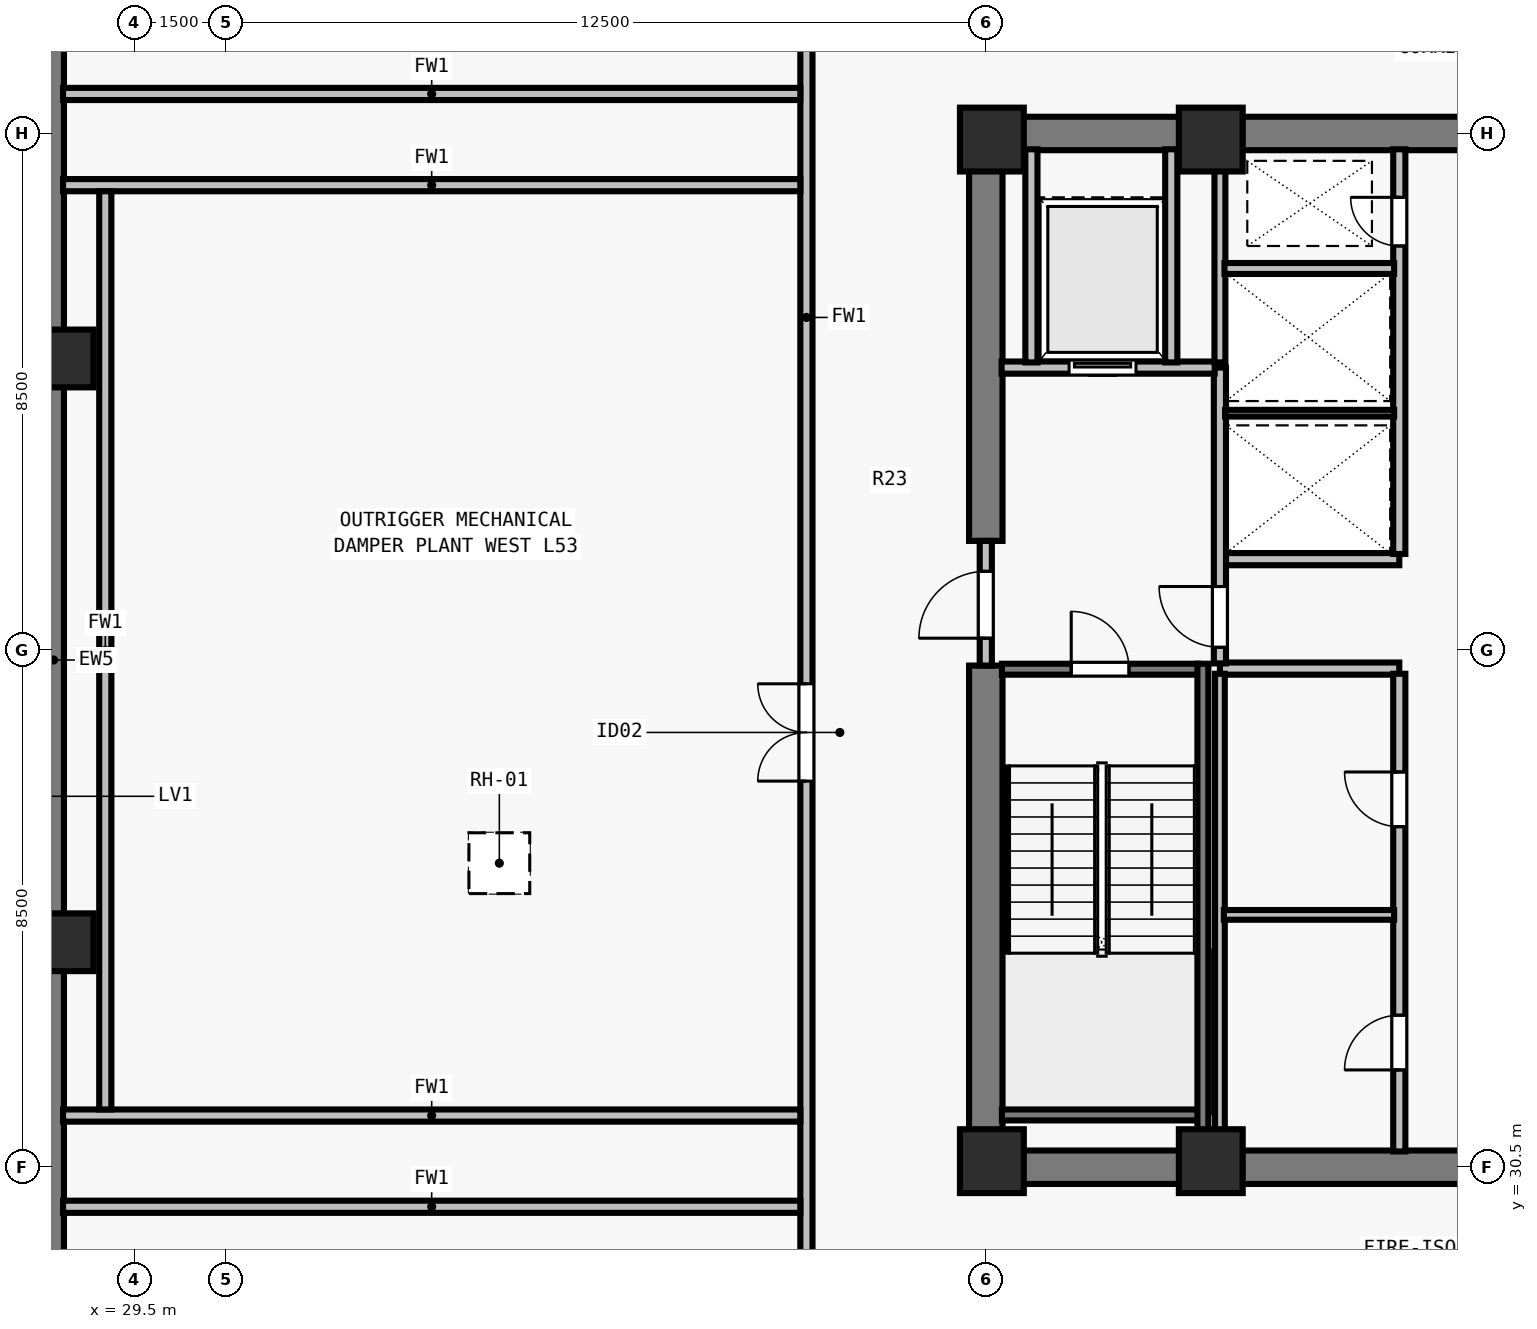
"""IFC4 building model, lengths in metres.
Left out: names, types, materials, properties, quantities, classifications, styles, units other than length and angle.
Written with IfcOpenShell. Run it as: python <this file> out.ifc"""

import sys

from ifc_helpers import new_model, si_unit, direction, frame, frame_2d, origin, origin_2d, place, context, subcontext, project, spatial, rectangle, extrude, element, fill, save


model = new_model("IFC4")
c1 = context("Model", 3, precision=1e-05, world=origin(), true_north=direction((0.0, 1.0)))
c2 = subcontext(c1, "Body", "Model", "MODEL_VIEW")
j1 = project(units=[si_unit("LENGTHUNIT", "METRE"), si_unit("PLANEANGLEUNIT", "RADIAN")], contexts=[c1])
p1 = place(None, origin())
s1 = spatial("IfcSite", under=j1, at=p1, CompositionType="ELEMENT")
p2 = place(p1, origin())
s2 = spatial("IfcBuilding", under=s1, at=p2, CompositionType="ELEMENT")
p3 = place(p2, frame((0.0, 0.0, 193.5)))
s3 = spatial("IfcBuildingStorey", under=s2, at=p3, CompositionType="ELEMENT", Elevation=193.5)
for number, where, z_axis, x_axis in (
    (1, (43.6, 30.6, 0.0), (0.0, 0.0, 1.0), (1.0, 0.0, 0.0)),
    (2, (47.2, 30.6, 0.0), (0.0, 0.0, 1.0), (1.0, 0.0, 0.0)),
    (3, (43.6, 47.4, 0.0), (0.0, 0.0, 1.0), (1.0, 0.0, 0.0)),
    (4, (47.2, 47.4, 0.0), (0.0, 0.0, 1.0), (1.0, 0.0, 0.0)),
):
    element("IfcColumn", number, at=place(p3, frame(where, z_axis=z_axis, x_axis=x_axis)), inside=s3, PredefinedType="COLUMN", context=c2, shape_type="SweptSolid", body=[
        extrude(rectangle(XDim=1.05, YDim=1.05, at=origin_2d()), origin(), (0.0, 0.0, 1.0), 4.5),
    ])
for number, where, z_axis, x_axis in (
    (5, (28.35, 43.8, 0.0), (0.0, 0.0, 1.0), (0.0, 1.0, 0.0)),
    (6, (28.35, 34.2, 0.0), (0.0, 0.0, 1.0), (0.0, 1.0, 0.0)),
):
    element("IfcColumn", number, at=place(p3, frame(where, z_axis=z_axis, x_axis=x_axis)), inside=s3, PredefinedType="COLUMN", context=c2, shape_type="SweptSolid", body=[
        extrude(rectangle(XDim=0.95, YDim=0.95, at=origin_2d()), origin(), (0.0, 0.0, 1.0), 4.5),
    ])
p4 = place(p3, frame((28.17, 19.0, 0.0), z_axis=(0.0, 0.0, 1.0), x_axis=(0.0, 1.0, 0.0)))
e7 = element("IfcWall", 7, at=p4, inside=s3, PredefinedType="SOLIDWALL", context=c2, shape_type="SweptSolid", body=[
    extrude(rectangle(XDim=39.682, YDim=0.34, at=frame_2d((19.841, 0.0))), origin(), (0.0, 0.0, 1.0), 4.29),
])
for number, where, z_axis, x_axis in (
    (8, (43.225, 30.5, 0.0), (0.0, 0.0, 1.0), (1.0, 0.0, 0.0)),
    (9, (43.225, 47.5, 0.0), (0.0, 0.0, 1.0), (1.0, 0.0, 0.0)),
):
    element("IfcWall", number, at=place(p3, frame(where, z_axis=z_axis, x_axis=x_axis)), inside=s3, PredefinedType="SHEAR", context=c2, shape_type="SweptSolid", body=[
        extrude(rectangle(XDim=17.55, YDim=0.55, at=frame_2d((8.775, 0.0))), origin(), (0.0, 0.0, 1.0), 4.29),
    ])
p5 = place(p3, frame((43.5, 30.765, 0.0), z_axis=(0.0, 0.0, 1.0), x_axis=(0.0, 1.0, 0.0)))
e10 = element("IfcWall", 10, at=p5, inside=s3, PredefinedType="SHEAR", context=c2, shape_type="SweptSolid", body=[
    extrude(rectangle(XDim=7.985, YDim=0.55, at=frame_2d((3.993, 0.0))), origin(), (0.0, 0.0, 1.0), 4.29),
])
p6 = place(p3, frame((43.5, 40.8, 0.0), z_axis=(0.0, 0.0, 1.0), x_axis=(0.0, 1.0, 0.0)))
e11 = element("IfcWall", 11, at=p6, inside=s3, PredefinedType="SHEAR", context=c2, shape_type="SweptSolid", body=[
    extrude(rectangle(XDim=6.435, YDim=0.55, at=frame_2d((3.218, 0.0))), origin(), (0.0, 0.0, 1.0), 4.29),
])
for number, where, z_axis, x_axis in (
    (12, (47.35, 38.7, 0.0), (0.0, 0.0, 1.0), (1.0, 0.0, 0.0)),
    (13, (47.35, 40.5, 0.0), (0.0, 0.0, 1.0), (1.0, 0.0, 0.0)),
):
    element("IfcWall", number, at=place(p3, frame(where, z_axis=z_axis, x_axis=x_axis)), inside=s3, PredefinedType="SOLIDWALL", context=c2, shape_type="SweptSolid", body=[
        extrude(rectangle(XDim=2.95, YDim=0.2, at=frame_2d((1.475, 0.0))), origin(), (0.0, 0.0, 1.0), 4.29),
    ])
p7 = place(p3, frame((50.3, 30.76, 0.0), z_axis=(0.0, 0.0, 1.0), x_axis=(0.0, 1.0, 0.0)))
e14 = element("IfcWall", 14, at=p7, inside=s3, PredefinedType="SOLIDWALL", context=c2, shape_type="SweptSolid", body=[
    extrude(rectangle(XDim=7.855, YDim=0.2, at=frame_2d((3.927, 0.0))), origin(), (0.0, 0.0, 1.0), 4.29),
])
p8 = place(p7, frame((1.34, 0.0, 0.0)))
e15 = element("IfcOpeningElement", 15, at=p8, cuts=e14, PredefinedType="OPENING", context=c2, shape_type="SweptSolid", body=[
    extrude(rectangle(XDim=0.9, YDim=2.12, at=frame_2d((0.45, 1.06))), frame((0.0, 0.11, 0.0), z_axis=(0.0, -1.0, 0.0), x_axis=(1.0, 0.0, 0.0)), (0.0, 0.0, 1.0), 0.22),
])
p9 = place(p7, frame((5.34, 0.0, 0.0)))
e16 = element("IfcOpeningElement", 16, at=p9, cuts=e14, PredefinedType="OPENING", context=c2, shape_type="SweptSolid", body=[
    extrude(rectangle(XDim=0.9, YDim=2.12, at=frame_2d((0.45, 1.06))), frame((0.0, 0.11, 0.0), z_axis=(0.0, -1.0, 0.0), x_axis=(1.0, 0.0, 0.0)), (0.0, 0.0, 1.0), 0.22),
])
p10 = place(p3, frame((50.3, 40.585, 0.0), z_axis=(0.0, 0.0, 1.0), x_axis=(0.0, 1.0, 0.0)))
e17 = element("IfcWall", 17, at=p10, inside=s3, PredefinedType="SOLIDWALL", context=c2, shape_type="SweptSolid", body=[
    extrude(rectangle(XDim=6.655, YDim=0.2, at=frame_2d((3.328, 0.0))), origin(), (0.0, 0.0, 1.0), 4.29),
])
p11 = place(p10, frame((5.065, 0.0, 0.0)))
e18 = element("IfcOpeningElement", 18, at=p11, cuts=e17, PredefinedType="OPENING", context=c2, shape_type="SweptSolid", body=[
    extrude(rectangle(XDim=0.8, YDim=2.08, at=frame_2d((0.4, 1.04))), frame((0.0, 0.11, 0.0), z_axis=(0.0, -1.0, 0.0), x_axis=(1.0, 0.0, 0.0)), (0.0, 0.0, 1.0), 0.22),
])
p12 = place(p3, frame((43.5, 38.75, 0.0), z_axis=(0.0, 0.0, 1.0), x_axis=(0.0, 1.0, 0.0)))
e19 = element("IfcWall", 19, at=p12, inside=s3, PredefinedType="SOLIDWALL", context=c2, shape_type="SweptSolid", body=[
    extrude(rectangle(XDim=2.05, YDim=0.2, at=frame_2d((1.025, 0.0))), origin(), (0.0, 0.0, 1.0), 4.29),
])
p13 = place(p12, frame((0.45, 0.0, 0.0)))
e20 = element("IfcOpeningElement", 20, at=p13, cuts=e19, PredefinedType="OPENING", context=c2, shape_type="SweptSolid", body=[
    extrude(rectangle(XDim=1.1, YDim=2.15, at=frame_2d((0.55, 1.075))), frame((0.0, 0.11, 0.0), z_axis=(0.0, -1.0, 0.0), x_axis=(1.0, 0.0, 0.0)), (0.0, 0.0, 1.0), 0.22),
])
p14 = place(p3, frame((47.35, 38.785, 0.0), z_axis=(0.0, 0.0, 1.0), x_axis=(0.0, 1.0, 0.0)))
e21 = element("IfcWall", 21, at=p14, inside=s3, PredefinedType="SOLIDWALL", context=c2, shape_type="SweptSolid", body=[
    extrude(rectangle(XDim=4.865, YDim=0.2, at=frame_2d((2.433, 0.0))), origin(), (0.0, 0.0, 1.0), 4.29),
])
p15 = place(p14, frame((0.265, 0.0, 0.0)))
e22 = element("IfcOpeningElement", 22, at=p15, cuts=e21, PredefinedType="OPENING", context=c2, shape_type="SweptSolid", body=[
    extrude(rectangle(XDim=1.0, YDim=2.15, at=frame_2d((0.5, 1.075))), frame((0.0, 0.11, 0.0), z_axis=(0.0, -1.0, 0.0), x_axis=(1.0, 0.0, 0.0)), (0.0, 0.0, 1.0), 0.22),
])
p16 = place(p3, frame((43.76, 43.65, 0.0), z_axis=(0.0, 0.0, 1.0), x_axis=(1.0, 0.0, 0.0)))
e23 = element("IfcWall", 23, at=p16, inside=s3, PredefinedType="SOLIDWALL", context=c2, shape_type="SweptSolid", body=[
    extrude(rectangle(XDim=3.505, YDim=0.2, at=frame_2d((1.752, 0.0))), origin(), (0.0, 0.0, 1.0), 4.29),
])
p17 = place(p16, frame((1.11, 0.0, 0.0)))
e24 = element("IfcOpeningElement", 24, at=p17, cuts=e23, PredefinedType="OPENING", context=c2, shape_type="SweptSolid", body=[
    extrude(rectangle(XDim=1.1, YDim=2.2, at=frame_2d((0.55, 1.1))), frame((0.0, 0.11, 0.0), z_axis=(0.0, -1.0, 0.0), x_axis=(1.0, 0.0, 0.0)), (0.0, 0.0, 1.0), 0.22),
])
for number, where, z_axis, x_axis in (
    (25, (46.55, 43.735, 0.0), (0.0, 0.0, 1.0), (0.0, 1.0, 0.0)),
    (26, (44.25, 43.735, 0.0), (0.0, 0.0, 1.0), (0.0, 1.0, 0.0)),
):
    element("IfcWall", number, at=place(p3, frame(where, z_axis=z_axis, x_axis=x_axis)), inside=s3, PredefinedType="SOLIDWALL", context=c2, shape_type="SweptSolid", body=[
        extrude(rectangle(XDim=3.505, YDim=0.2, at=frame_2d((1.752, 0.0))), origin(), (0.0, 0.0, 1.0), 4.29),
    ])
p18 = place(p3, frame((47.35, 30.76, 0.0), z_axis=(0.0, 0.0, 1.0), x_axis=(0.0, 1.0, 0.0)))
e27 = element("IfcWall", 27, at=p18, inside=s3, PredefinedType="PARTITIONING", context=c2, shape_type="SweptSolid", body=[
    extrude(rectangle(XDim=7.855, YDim=0.16, at=frame_2d((3.927, 0.0))), origin(), (0.0, 0.0, 1.0), 4.29),
])
p19 = place(p3, frame((47.415, 34.65, 0.0), z_axis=(0.0, 0.0, 1.0), x_axis=(1.0, 0.0, 0.0)))
e28 = element("IfcWall", 28, at=p19, inside=s3, PredefinedType="PARTITIONING", context=c2, shape_type="SweptSolid", body=[
    extrude(rectangle(XDim=2.8, YDim=0.16, at=frame_2d((1.4, 0.0))), origin(), (0.0, 0.0, 1.0), 4.29),
])
p20 = place(p3, frame((47.35, 43.735, 0.0), z_axis=(0.0, 0.0, 1.0), x_axis=(0.0, 1.0, 0.0)))
e29 = element("IfcWall", 29, at=p20, inside=s3, PredefinedType="SOLIDWALL", context=c2, shape_type="SweptSolid", body=[
    extrude(rectangle(XDim=3.505, YDim=0.18, at=frame_2d((1.752, 0.0))), origin(), (0.0, 0.0, 1.0), 4.29),
])
p21 = place(p3, frame((47.435, 42.9, 0.0), z_axis=(0.0, 0.0, 1.0), x_axis=(1.0, 0.0, 0.0)))
e30 = element("IfcWall", 30, at=p21, inside=s3, PredefinedType="PARTITIONING", context=c2, shape_type="SweptSolid", body=[
    extrude(rectangle(XDim=2.78, YDim=0.11, at=frame_2d((1.39, 0.0))), origin(), (0.0, 0.0, 1.0), 4.29),
])
p22 = place(p3, frame((47.425, 45.28, 0.0), z_axis=(0.0, 0.0, 1.0), x_axis=(1.0, 0.0, 0.0)))
e31 = element("IfcWall", 31, at=p22, inside=s3, PredefinedType="SOLIDWALL", context=c2, shape_type="SweptSolid", body=[
    extrude(rectangle(XDim=2.79, YDim=0.18, at=frame_2d((1.395, 0.0))), origin(), (0.0, 0.0, 1.0), 4.29),
])
p23 = place(p3, frame((40.55, 27.65, 0.0), z_axis=(0.0, 0.0, 1.0), x_axis=(0.0, 1.0, 0.0)))
e32 = element("IfcWall", 32, at=p23, inside=s3, PredefinedType="SOLIDWALL", context=c2, shape_type="SweptSolid", body=[
    extrude(rectangle(XDim=22.7, YDim=0.2, at=frame_2d((11.35, 0.0))), origin(), (0.0, 0.0, 1.0), 4.29),
])
p24 = place(p23, frame((9.2, 0.0, 0.0)))
e33 = element("IfcOpeningElement", 33, at=p24, cuts=e32, PredefinedType="OPENING", context=c2, shape_type="SweptSolid", body=[
    extrude(rectangle(XDim=1.6, YDim=2.2, at=frame_2d((0.8, 1.1))), frame((0.0, 0.11, 0.0), z_axis=(0.0, -1.0, 0.0), x_axis=(1.0, 0.0, 0.0)), (0.0, 0.0, 1.0), 0.22),
])
p25 = place(p3, frame((28.325, 29.85, 0.0), z_axis=(0.0, 0.0, 1.0), x_axis=(1.0, 0.0, 0.0)))
e34 = element("IfcWall", 34, at=p25, inside=s3, PredefinedType="SOLIDWALL", context=c2, shape_type="SweptSolid", body=[
    extrude(rectangle(XDim=12.125, YDim=0.2, at=frame_2d((6.062, 0.0))), origin(), (0.0, 0.0, 1.0), 4.29),
])
for number, where, z_axis, x_axis in (
    (35, (28.325, 31.35, 0.0), (0.0, 0.0, 1.0), (1.0, 0.0, 0.0)),
    (36, (28.325, 46.65, 0.0), (0.0, 0.0, 1.0), (1.0, 0.0, 0.0)),
):
    element("IfcWall", number, at=place(p3, frame(where, z_axis=z_axis, x_axis=x_axis)), inside=s3, PredefinedType="SOLIDWALL", context=c2, shape_type="SweptSolid", body=[
        extrude(rectangle(XDim=12.125, YDim=0.2, at=frame_2d((6.062, 0.0))), origin(), (0.0, 0.0, 1.0), 2.465),
    ])
p26 = place(p3, frame((28.325, 48.15, 0.0), z_axis=(0.0, 0.0, 1.0), x_axis=(1.0, 0.0, 0.0)))
e37 = element("IfcWall", 37, at=p26, inside=s3, PredefinedType="SOLIDWALL", context=c2, shape_type="SweptSolid", body=[
    extrude(rectangle(XDim=12.125, YDim=0.2, at=frame_2d((6.062, 0.0))), origin(), (0.0, 0.0, 1.0), 4.29),
])
p27 = place(p3, frame((29.02, 31.45, 0.0), z_axis=(0.0, 0.0, 1.0), x_axis=(0.0, 1.0, 0.0)))
e38 = element("IfcWall", 38, at=p27, inside=s3, PredefinedType="SOLIDWALL", context=c2, shape_type="SweptSolid", body=[
    extrude(rectangle(XDim=15.1, YDim=0.2, at=frame_2d((7.55, 0.0))), origin(), (0.0, 0.0, 1.0), 4.29),
])
p28 = place(p3, frame((43.765, 38.69, 0.0), z_axis=(0.0, 0.0, 1.0), x_axis=(1.0, 0.0, 0.0)))
e39 = element("IfcWall", 39, at=p28, inside=s3, PredefinedType="SOLIDWALL", context=c2, shape_type="SweptSolid", body=[
    extrude(rectangle(XDim=3.23, YDim=0.18, at=frame_2d((1.615, 0.0))), origin(), (0.0, 0.0, 1.0), 4.29),
])
p29 = place(p28, frame((1.14, 0.0, 0.0)))
e40 = element("IfcOpeningElement", 40, at=p29, cuts=e39, PredefinedType="OPENING", context=c2, shape_type="SweptSolid", body=[
    extrude(rectangle(XDim=0.95, YDim=2.15, at=frame_2d((0.475, 1.075))), frame((0.0, 0.1, 0.0), z_axis=(0.0, -1.0, 0.0), x_axis=(1.0, 0.0, 0.0)), (0.0, 0.0, 1.0), 0.2),
])
p30 = place(p3, frame((43.765, 31.36, 0.0), z_axis=(0.0, 0.0, 1.0), x_axis=(1.0, 0.0, 0.0)))
e41 = element("IfcWall", 41, at=p30, inside=s3, PredefinedType="SOLIDWALL", context=c2, shape_type="SweptSolid", body=[
    extrude(rectangle(XDim=3.23, YDim=0.18, at=frame_2d((1.615, 0.0))), origin(), (0.0, 0.0, 1.0), 4.29),
])
p31 = place(p3, frame((47.07, 38.78, 0.0), z_axis=(0.0, 0.0, 1.0), x_axis=(0.0, -1.0, 0.0)))
e42 = element("IfcWall", 42, at=p31, inside=s3, PredefinedType="SOLIDWALL", context=c2, shape_type="SweptSolid", body=[
    extrude(rectangle(XDim=8.017, YDim=0.18, at=frame_2d((4.009, 0.0))), origin(), (0.0, 0.0, 1.0), 4.29),
])
p32 = place(p3, frame((0.0, 0.0, -0.26)))
p33 = place(p32, frame((35.5, 35.5, 0.0)))
p34 = place(p33, frame((0.0, 0.0, 0.21)))
e43 = element("IfcDoor", 43, at=p34, inside=s3, OperationType="SINGLE_SWING_LEFT", PredefinedType="TRAPDOOR", context=c2, shape_type="SweptSolid", body=[
    extrude(rectangle(XDim=1.0, YDim=1.0, at=origin_2d()), origin(), (0.0, 0.0, 1.0), 0.05),
])
p35 = place(p13, origin())
e44 = element("IfcDoor", 44, at=p35, inside=s3, OperationType="SINGLE_SWING_LEFT", PredefinedType="DOOR", context=c2, shape_type="SweptSolid", body=[
    extrude(rectangle(XDim=1.1, YDim=2.15, at=frame_2d((0.55, 1.075))), frame((0.0, 0.025, 0.0), z_axis=(0.0, -1.0, 0.0), x_axis=(1.0, 0.0, 0.0)), (0.0, 0.0, 1.0), 0.05),
])
fill(e20, e44)
p36 = place(p15, origin())
e45 = element("IfcDoor", 45, at=p36, inside=s3, OperationType="SINGLE_SWING_RIGHT", PredefinedType="DOOR", context=c2, shape_type="SweptSolid", body=[
    extrude(rectangle(XDim=1.0, YDim=2.15, at=frame_2d((0.5, 1.075))), frame((0.0, 0.025, 0.0), z_axis=(0.0, -1.0, 0.0), x_axis=(1.0, 0.0, 0.0)), (0.0, 0.0, 1.0), 0.05),
])
fill(e22, e45)
p37 = place(p17, origin())
e46 = element("IfcDoor", 46, at=p37, inside=s3, OperationType="SLIDING_TO_LEFT", PredefinedType="DOOR", context=c2, shape_type="SweptSolid", body=[
    extrude(rectangle(XDim=1.1, YDim=2.2, at=frame_2d((0.55, 1.1))), frame((0.0, 0.025, 0.0), z_axis=(0.0, -1.0, 0.0), x_axis=(1.0, 0.0, 0.0)), (0.0, 0.0, 1.0), 0.05),
])
fill(e24, e46)
p38 = place(p8, origin())
e47 = element("IfcDoor", 47, at=p38, inside=s3, OperationType="SINGLE_SWING_LEFT", PredefinedType="DOOR", context=c2, shape_type="SweptSolid", body=[
    extrude(rectangle(XDim=0.9, YDim=2.12, at=frame_2d((0.45, 1.06))), frame((0.0, 0.025, 0.0), z_axis=(0.0, -1.0, 0.0), x_axis=(1.0, 0.0, 0.0)), (0.0, 0.0, 1.0), 0.05),
])
fill(e15, e47)
p39 = place(p9, origin())
e48 = element("IfcDoor", 48, at=p39, inside=s3, OperationType="SINGLE_SWING_RIGHT", PredefinedType="DOOR", context=c2, shape_type="SweptSolid", body=[
    extrude(rectangle(XDim=0.9, YDim=2.12, at=frame_2d((0.45, 1.06))), frame((0.0, 0.025, 0.0), z_axis=(0.0, -1.0, 0.0), x_axis=(1.0, 0.0, 0.0)), (0.0, 0.0, 1.0), 0.05),
])
fill(e16, e48)
p40 = place(p11, origin())
e49 = element("IfcDoor", 49, at=p40, inside=s3, OperationType="SINGLE_SWING_RIGHT", PredefinedType="DOOR", context=c2, shape_type="SweptSolid", body=[
    extrude(rectangle(XDim=0.8, YDim=2.08, at=frame_2d((0.4, 1.04))), frame((0.0, 0.025, 0.0), z_axis=(0.0, -1.0, 0.0), x_axis=(1.0, 0.0, 0.0)), (0.0, 0.0, 1.0), 0.05),
])
fill(e18, e49)
p41 = place(p24, origin())
e50 = element("IfcDoor", 50, at=p41, inside=s3, OperationType="DOUBLE_DOOR_SINGLE_SWING", PredefinedType="DOOR", context=c2, shape_type="SweptSolid", body=[
    extrude(rectangle(XDim=1.6, YDim=2.2, at=frame_2d((0.8, 1.1))), frame((0.0, 0.025, 0.0), z_axis=(0.0, -1.0, 0.0), x_axis=(1.0, 0.0, 0.0)), (0.0, 0.0, 1.0), 0.05),
])
fill(e33, e50)
p42 = place(p29, origin())
e51 = element("IfcDoor", 51, at=p42, inside=s3, OperationType="SINGLE_SWING_LEFT", PredefinedType="DOOR", context=c2, shape_type="SweptSolid", body=[
    extrude(rectangle(XDim=0.95, YDim=2.15, at=frame_2d((0.475, 1.075))), frame((0.0, 0.025, 0.0), z_axis=(0.0, -1.0, 0.0), x_axis=(1.0, 0.0, 0.0)), (0.0, 0.0, 1.0), 0.05),
])
fill(e40, e51)
save(model, sys.argv[1])
